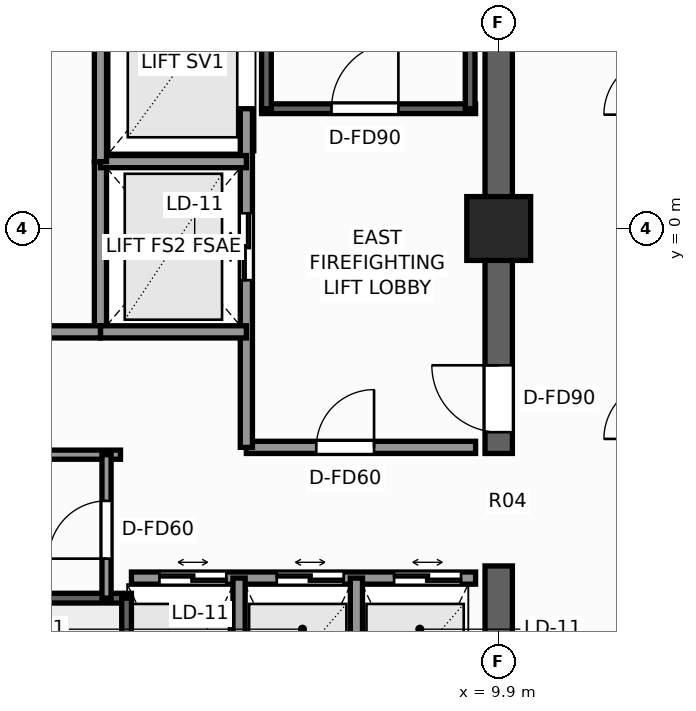
"""IFC4 building model, lengths in metres.
Left out: names, types, materials, properties, quantities, classifications, styles, units other than length and angle.
Written with IfcOpenShell. Run it as: python <this file> out.ifc"""

import sys

from ifc_helpers import new_model, si_unit, direction, frame, frame_2d, origin, origin_2d, place, context, subcontext, project, spatial, rectangle, extrude, element, fill, save


model = new_model("IFC4")
c1 = context("Model", 3, precision=1e-05, world=origin(), true_north=direction((0.0, 1.0)))
c2 = subcontext(c1, "Body", "Model", "MODEL_VIEW")
j1 = project(units=[si_unit("LENGTHUNIT", "METRE"), si_unit("PLANEANGLEUNIT", "RADIAN")], contexts=[c1])
p1 = place(None, origin())
s1 = spatial("IfcSite", under=j1, at=p1, CompositionType="ELEMENT")
p2 = place(p1, origin())
s2 = spatial("IfcBuilding", under=s1, at=p2, CompositionType="ELEMENT")
p3 = place(p2, frame((0.0, 0.0, 213.0)))
s3 = spatial("IfcBuildingStorey", under=s2, at=p3, CompositionType="ELEMENT", Elevation=213.0)
p4 = place(p3, frame((9.9, -9.675, 0.0), z_axis=(0.0, 0.0, 1.0), x_axis=(0.0, 1.0, 0.0)))
e1 = element("IfcWall", 1, at=p4, inside=s3, PredefinedType="SHEAR", context=c2, shape_type="SweptSolid", body=[
    extrude(rectangle(XDim=4.125, YDim=0.45, at=frame_2d((2.062, 0.0))), origin(), (0.0, 0.0, 1.0), 3.3),
])
p5 = place(p3, frame((9.9, -3.7, 0.0), z_axis=(0.0, 0.0, 1.0), x_axis=(0.0, 1.0, 0.0)))
e2 = element("IfcWall", 2, at=p5, inside=s3, PredefinedType="SHEAR", context=c2, shape_type="SweptSolid", body=[
    extrude(rectangle(XDim=13.375, YDim=0.45, at=frame_2d((6.688, 0.0))), origin(), (0.0, 0.0, 1.0), 3.3),
])
p6 = place(p5, frame((0.35, 0.0, 0.0)))
e3 = element("IfcOpeningElement", 3, at=p6, cuts=e2, PredefinedType="OPENING", context=c2, shape_type="SweptSolid", body=[
    extrude(rectangle(XDim=1.1, YDim=2.2, at=frame_2d((0.55, 1.1))), frame((0.0, 0.235, 0.0), z_axis=(0.0, -1.0, 0.0), x_axis=(1.0, 0.0, 0.0)), (0.0, 0.0, 1.0), 0.47),
])
p7 = place(p3, frame((9.9, 0.0, 0.0), z_axis=(0.0, 0.0, 1.0), x_axis=(1.0, 0.0, 0.0)))
e4 = element("IfcColumn", 4, at=p7, inside=s3, PredefinedType="COLUMN", context=c2, shape_type="SweptSolid", body=[
    extrude(rectangle(XDim=1.05, YDim=1.05, at=origin_2d()), origin(), (0.0, 0.0, 1.0), 3.3),
])
p8 = place(p3, frame((6.0, 1.97, 0.0), z_axis=(0.0, 0.0, 1.0), x_axis=(1.0, 0.0, 0.0)))
e5 = element("IfcWall", 5, at=p8, inside=s3, PredefinedType="SHEAR", context=c2, shape_type="SweptSolid", body=[
    extrude(rectangle(XDim=3.52, YDim=0.16, at=frame_2d((1.76, 0.0))), origin(), (0.0, 0.0, 1.0), 3.3),
])
p9 = place(p8, frame((1.15, 0.0, 0.0)))
e6 = element("IfcOpeningElement", 6, at=p9, cuts=e5, PredefinedType="OPENING", context=c2, shape_type="SweptSolid", body=[
    extrude(rectangle(XDim=1.1, YDim=2.2, at=frame_2d((0.55, 1.1))), frame((0.0, 0.09, 0.0), z_axis=(0.0, -1.0, 0.0), x_axis=(1.0, 0.0, 0.0)), (0.0, 0.0, 1.0), 0.18),
])
for number, where, z_axis, x_axis in (
    (7, (6.08, 1.97, 0.0), (0.0, 0.0, 1.0), (0.0, 1.0, 0.0)),
    (8, (9.43, 1.97, 0.0), (0.0, 0.0, 1.0), (0.0, 1.0, 0.0)),
):
    element("IfcWall", number, at=place(p3, frame(where, z_axis=z_axis, x_axis=x_axis)), inside=s3, PredefinedType="SHEAR", context=c2, shape_type="SweptSolid", body=[
        extrude(rectangle(XDim=7.56, YDim=0.16, at=frame_2d((3.78, 0.0))), origin(), (0.0, 0.0, 1.0), 3.3),
    ])
p10 = place(p3, frame((-3.86, -6.08, 0.0), z_axis=(0.0, 0.0, 1.0), x_axis=(1.0, 0.0, 0.0)))
e9 = element("IfcWall", 9, at=p10, inside=s3, PredefinedType="SHEAR", context=c2, shape_type="SweptSolid", body=[
    extrude(rectangle(XDim=7.72, YDim=0.16, at=frame_2d((3.86, 0.0))), origin(), (0.0, 0.0, 1.0), 3.3),
])
p11 = place(p3, frame((3.78, -9.43, 0.0), z_axis=(0.0, 0.0, 1.0), x_axis=(0.0, 1.0, 0.0)))
e10 = element("IfcWall", 10, at=p11, inside=s3, PredefinedType="SHEAR", context=c2, shape_type="SweptSolid", body=[
    extrude(rectangle(XDim=3.35, YDim=0.16, at=frame_2d((1.675, 0.0))), origin(), (0.0, 0.0, 1.0), 3.3),
])
p12 = place(p3, frame((5.75, -3.6, 0.0), z_axis=(0.0, 0.0, 1.0), x_axis=(1.0, 0.0, 0.0)))
e11 = element("IfcWall", 11, at=p12, inside=s3, PredefinedType="SOLIDWALL", context=c2, shape_type="SweptSolid", body=[
    extrude(rectangle(XDim=3.77, YDim=0.2, at=frame_2d((1.885, 0.0))), origin(), (0.0, 0.0, 1.0), 3.08),
])
p13 = place(p12, frame((1.15, 0.0, 0.0)))
e12 = element("IfcOpeningElement", 12, at=p13, cuts=e11, PredefinedType="OPENING", context=c2, shape_type="SweptSolid", body=[
    extrude(rectangle(XDim=0.95, YDim=2.06, at=frame_2d((0.475, 1.03))), frame((0.0, 0.11, 0.0), z_axis=(0.0, -1.0, 0.0), x_axis=(1.0, 0.0, 0.0)), (0.0, 0.0, 1.0), 0.22),
])
p14 = place(p3, frame((5.75, -3.6, 0.0), z_axis=(0.0, 0.0, 1.0), x_axis=(0.0, 1.0, 0.0)))
e13 = element("IfcWall", 13, at=p14, inside=s3, PredefinedType="SOLIDWALL", context=c2, shape_type="SweptSolid", body=[
    extrude(rectangle(XDim=5.57, YDim=0.2, at=frame_2d((2.785, 0.0))), origin(), (0.0, 0.0, 1.0), 3.08),
])
p15 = place(p14, frame((2.75, 0.0, 0.0)))
e14 = element("IfcOpeningElement", 14, at=p15, cuts=e13, PredefinedType="OPENING", context=c2, shape_type="SweptSolid", body=[
    extrude(rectangle(XDim=1.1, YDim=2.2, at=frame_2d((0.55, 1.1))), frame((0.0, 0.11, 0.0), z_axis=(0.0, -1.0, 0.0), x_axis=(1.0, 0.0, 0.0)), (0.0, 0.0, 1.0), 0.22),
])
p16 = place(p3, frame((3.35, -1.7, 0.0), z_axis=(0.0, 0.0, 1.0), x_axis=(0.0, 1.0, 0.0)))
e15 = element("IfcWall", 15, at=p16, inside=s3, PredefinedType="SOLIDWALL", context=c2, shape_type="SweptSolid", body=[
    extrude(rectangle(XDim=2.8, YDim=0.2, at=frame_2d((1.4, 0.0))), origin(), (0.0, 0.0, 1.0), 3.08),
])
for number, where, z_axis, x_axis in (
    (16, (3.35, -1.7, 0.0), (0.0, 0.0, 1.0), (1.0, 0.0, 0.0)),
    (17, (3.35, 1.1, 0.0), (0.0, 0.0, 1.0), (1.0, 0.0, 0.0)),
):
    element("IfcWall", number, at=place(p3, frame(where, z_axis=z_axis, x_axis=x_axis)), inside=s3, PredefinedType="SOLIDWALL", context=c2, shape_type="SweptSolid", body=[
        extrude(rectangle(XDim=2.4, YDim=0.2, at=frame_2d((1.2, 0.0))), origin(), (0.0, 0.0, 1.0), 3.08),
    ])
p17 = place(p3, frame((3.86, -5.75, 0.0), z_axis=(0.0, 0.0, 1.0), x_axis=(1.0, 0.0, 0.0)))
e18 = element("IfcWall", 18, at=p17, inside=s3, PredefinedType="SOLIDWALL", context=c2, shape_type="SweptSolid", body=[
    extrude(rectangle(XDim=5.66, YDim=0.2, at=frame_2d((2.83, 0.0))), origin(), (0.0, 0.0, 1.0), 3.08),
])
p18 = place(p17, frame((0.46, 0.0, 0.0)))
e19 = element("IfcOpeningElement", 19, at=p18, cuts=e18, PredefinedType="OPENING", context=c2, shape_type="SweptSolid", body=[
    extrude(rectangle(XDim=1.1, YDim=2.2, at=frame_2d((0.55, 1.1))), frame((0.0, 0.11, 0.0), z_axis=(0.0, -1.0, 0.0), x_axis=(1.0, 0.0, 0.0)), (0.0, 0.0, 1.0), 0.22),
])
p19 = place(p17, frame((2.39, 0.0, 0.0)))
e20 = element("IfcOpeningElement", 20, at=p19, cuts=e18, PredefinedType="OPENING", context=c2, shape_type="SweptSolid", body=[
    extrude(rectangle(XDim=1.1, YDim=2.2, at=frame_2d((0.55, 1.1))), frame((0.0, 0.11, 0.0), z_axis=(0.0, -1.0, 0.0), x_axis=(1.0, 0.0, 0.0)), (0.0, 0.0, 1.0), 0.22),
])
p20 = place(p17, frame((4.32, 0.0, 0.0)))
e21 = element("IfcOpeningElement", 21, at=p20, cuts=e18, PredefinedType="OPENING", context=c2, shape_type="SweptSolid", body=[
    extrude(rectangle(XDim=1.1, YDim=2.2, at=frame_2d((0.55, 1.1))), frame((0.0, 0.11, 0.0), z_axis=(0.0, -1.0, 0.0), x_axis=(1.0, 0.0, 0.0)), (0.0, 0.0, 1.0), 0.22),
])
for number, where, z_axis, x_axis in (
    (22, (5.63, -9.52, 0.0), (0.0, 0.0, 1.0), (0.0, 1.0, 0.0)),
    (23, (7.56, -9.52, 0.0), (0.0, 0.0, 1.0), (0.0, 1.0, 0.0)),
):
    element("IfcWall", number, at=place(p3, frame(where, z_axis=z_axis, x_axis=x_axis)), inside=s3, PredefinedType="SOLIDWALL", context=c2, shape_type="SweptSolid", body=[
        extrude(rectangle(XDim=3.77, YDim=0.2, at=frame_2d((1.885, 0.0))), origin(), (0.0, 0.0, 1.0), 3.08),
    ])
p21 = place(p3, frame((-3.35, -1.7, 0.0), z_axis=(0.0, 0.0, 1.0), x_axis=(1.0, 0.0, 0.0)))
e24 = element("IfcWall", 24, at=p21, inside=s3, PredefinedType="SOLIDWALL", context=c2, shape_type="SweptSolid", body=[
    extrude(rectangle(XDim=6.7, YDim=0.2, at=frame_2d((3.35, 0.0))), origin(), (0.0, 0.0, 1.0), 3.08),
])
p22 = place(p3, frame((3.35, 1.1, 0.0), z_axis=(0.0, 0.0, 1.0), x_axis=(0.0, 1.0, 0.0)))
e25 = element("IfcWall", 25, at=p22, inside=s3, PredefinedType="SOLIDWALL", context=c2, shape_type="SweptSolid", body=[
    extrude(rectangle(XDim=3.2, YDim=0.2, at=frame_2d((1.6, 0.0))), origin(), (0.0, 0.0, 1.0), 3.08),
])
p23 = place(p3, frame((-3.68, -3.72, 0.0), z_axis=(0.0, 0.0, 1.0), x_axis=(1.0, 0.0, 0.0)))
e26 = element("IfcWall", 26, at=p23, inside=s3, PredefinedType="PARTITIONING", context=c2, shape_type="SweptSolid", body=[
    extrude(rectangle(XDim=7.36, YDim=0.15, at=frame_2d((3.68, 0.0))), origin(), (0.0, 0.0, 1.0), 3.08),
])
p24 = place(p3, frame((3.45, -6.08, 0.0), z_axis=(0.0, 0.0, 1.0), x_axis=(0.0, 1.0, 0.0)))
e27 = element("IfcWall", 27, at=p24, inside=s3, PredefinedType="PARTITIONING", context=c2, shape_type="SweptSolid", body=[
    extrude(rectangle(XDim=2.36, YDim=0.15, at=frame_2d((1.18, 0.0))), origin(), (0.0, 0.0, 1.0), 3.08),
])
p25 = place(p24, frame((0.65, 0.0, 0.0)))
e28 = element("IfcOpeningElement", 28, at=p25, cuts=e27, PredefinedType="OPENING", context=c2, shape_type="SweptSolid", body=[
    extrude(rectangle(XDim=0.95, YDim=2.06, at=frame_2d((0.475, 1.03))), frame((0.0, 0.085, 0.0), z_axis=(0.0, -1.0, 0.0), x_axis=(1.0, 0.0, 0.0)), (0.0, 0.0, 1.0), 0.17),
])
p26 = place(p9, origin())
e29 = element("IfcDoor", 29, at=p26, inside=s3, OperationType="SINGLE_SWING_RIGHT", PredefinedType="DOOR", context=c2, shape_type="SweptSolid", body=[
    extrude(rectangle(XDim=1.1, YDim=2.2, at=frame_2d((0.55, 1.1))), frame((0.0, 0.025, 0.0), z_axis=(0.0, -1.0, 0.0), x_axis=(1.0, 0.0, 0.0)), (0.0, 0.0, 1.0), 0.05),
])
fill(e6, e29)
p27 = place(p6, origin())
e30 = element("IfcDoor", 30, at=p27, inside=s3, OperationType="SINGLE_SWING_RIGHT", PredefinedType="DOOR", context=c2, shape_type="SweptSolid", body=[
    extrude(rectangle(XDim=1.1, YDim=2.2, at=frame_2d((0.55, 1.1))), frame((0.0, 0.025, 0.0), z_axis=(0.0, -1.0, 0.0), x_axis=(1.0, 0.0, 0.0)), (0.0, 0.0, 1.0), 0.05),
])
fill(e3, e30)
p28 = place(p15, origin())
e31 = element("IfcDoor", 31, at=p28, inside=s3, OperationType="DOUBLE_DOOR_SLIDING", PredefinedType="DOOR", context=c2, shape_type="SweptSolid", body=[
    extrude(rectangle(XDim=1.1, YDim=2.2, at=frame_2d((0.55, 1.1))), frame((0.0, 0.025, 0.0), z_axis=(0.0, -1.0, 0.0), x_axis=(1.0, 0.0, 0.0)), (0.0, 0.0, 1.0), 0.05),
])
fill(e14, e31)
p29 = place(p18, origin())
e32 = element("IfcDoor", 32, at=p29, inside=s3, OperationType="DOUBLE_DOOR_SLIDING", PredefinedType="DOOR", context=c2, shape_type="SweptSolid", body=[
    extrude(rectangle(XDim=1.1, YDim=2.2, at=frame_2d((0.55, 1.1))), frame((0.0, 0.025, 0.0), z_axis=(0.0, -1.0, 0.0), x_axis=(1.0, 0.0, 0.0)), (0.0, 0.0, 1.0), 0.05),
])
fill(e19, e32)
p30 = place(p19, origin())
e33 = element("IfcDoor", 33, at=p30, inside=s3, OperationType="DOUBLE_DOOR_SLIDING", PredefinedType="DOOR", context=c2, shape_type="SweptSolid", body=[
    extrude(rectangle(XDim=1.1, YDim=2.2, at=frame_2d((0.55, 1.1))), frame((0.0, 0.025, 0.0), z_axis=(0.0, -1.0, 0.0), x_axis=(1.0, 0.0, 0.0)), (0.0, 0.0, 1.0), 0.05),
])
fill(e20, e33)
p31 = place(p20, origin())
e34 = element("IfcDoor", 34, at=p31, inside=s3, OperationType="DOUBLE_DOOR_SLIDING", PredefinedType="DOOR", context=c2, shape_type="SweptSolid", body=[
    extrude(rectangle(XDim=1.1, YDim=2.2, at=frame_2d((0.55, 1.1))), frame((0.0, 0.025, 0.0), z_axis=(0.0, -1.0, 0.0), x_axis=(1.0, 0.0, 0.0)), (0.0, 0.0, 1.0), 0.05),
])
fill(e21, e34)
p32 = place(p13, origin())
e35 = element("IfcDoor", 35, at=p32, inside=s3, OperationType="SINGLE_SWING_RIGHT", PredefinedType="DOOR", context=c2, shape_type="SweptSolid", body=[
    extrude(rectangle(XDim=0.95, YDim=2.06, at=frame_2d((0.475, 1.03))), frame((0.0, 0.025, 0.0), z_axis=(0.0, -1.0, 0.0), x_axis=(1.0, 0.0, 0.0)), (0.0, 0.0, 1.0), 0.05),
])
fill(e12, e35)
p33 = place(p25, origin())
e36 = element("IfcDoor", 36, at=p33, inside=s3, OperationType="SINGLE_SWING_LEFT", PredefinedType="DOOR", context=c2, shape_type="SweptSolid", body=[
    extrude(rectangle(XDim=0.95, YDim=2.06, at=frame_2d((0.475, 1.03))), frame((0.0, 0.025, 0.0), z_axis=(0.0, -1.0, 0.0), x_axis=(1.0, 0.0, 0.0)), (0.0, 0.0, 1.0), 0.05),
])
fill(e28, e36)
save(model, sys.argv[1])
